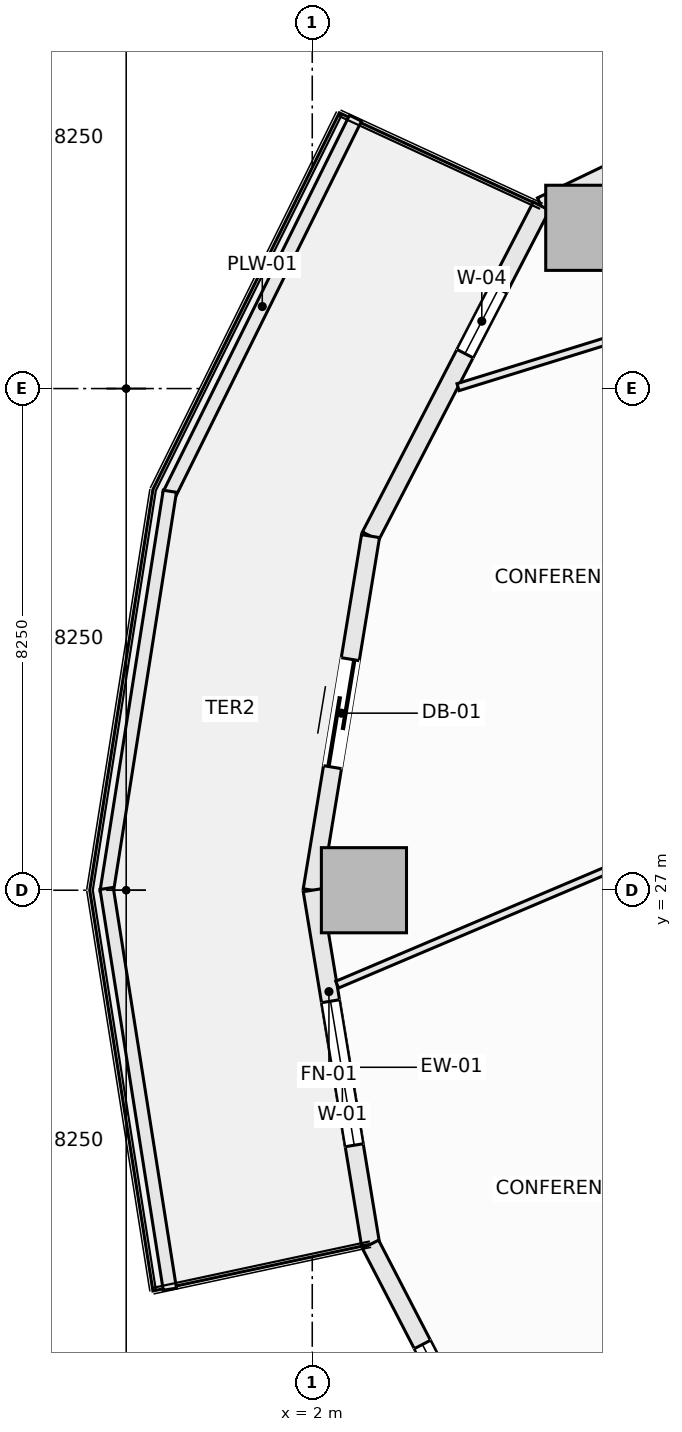
"""IFC4 building model, lengths in metres.
Left out: names, types, materials, properties, quantities, classifications, styles, units other than length and angle.
Written with IfcOpenShell. Run it as: python <this file> out.ifc"""

import sys

from ifc_helpers import new_model, si_unit, direction, frame, frame_2d, origin, origin_2d, place, context, subcontext, project, spatial, rectangle, extrude, element, fill, save


model = new_model("IFC4")
c1 = context("Model", 3, precision=1e-05, world=origin(), true_north=direction((0.0, 1.0)))
c2 = subcontext(c1, "Body", "Model", "MODEL_VIEW")
j1 = project(units=[si_unit("LENGTHUNIT", "METRE"), si_unit("PLANEANGLEUNIT", "RADIAN")], contexts=[c1])
p1 = place(None, origin())
s1 = spatial("IfcSite", under=j1, at=p1, CompositionType="ELEMENT")
p2 = place(p1, origin())
s2 = spatial("IfcBuilding", under=s1, at=p2, CompositionType="ELEMENT")
p3 = place(p2, frame((0.0, 0.0, 41.9)))
s3 = spatial("IfcBuildingStorey", under=s2, at=p3, CompositionType="ELEMENT", Elevation=41.9)
for number, where, z_axis, x_axis in (
    (1, (6.54, 37.894, -0.28), (0.0, 0.0, 1.0), (1.0, 0.0, 0.0)),
    (2, (2.85, 27.0, -0.28), (0.0, 0.0, 1.0), (1.0, 0.0, 0.0)),
):
    element("IfcColumn", number, at=place(p3, frame(where, z_axis=z_axis, x_axis=x_axis)), inside=s3, PredefinedType="COLUMN", context=c2, shape_type="SweptSolid", body=[
        extrude(rectangle(XDim=1.4, YDim=1.4, at=origin_2d()), origin(), (0.0, 0.0, 1.0), 3.85),
    ])
p4 = place(p3, frame((5.768, 38.25, 0.0), z_axis=(0.0, 0.0, 1.0), x_axis=(0.901360393999, 0.433069786673, 0.0)))
e3 = element("IfcWall", 3, at=p4, inside=s3, PredefinedType="SOLIDWALL", context=c2, shape_type="SweptSolid", body=[
    extrude(rectangle(XDim=6.842, YDim=0.3, at=frame_2d((3.421, 0.0))), origin(), (0.0, 0.0, 1.0), 3.093),
])
p5 = place(p4, frame((2.221, 0.0, 0.85)))
e4 = element("IfcOpeningElement", 4, at=p5, cuts=e3, PredefinedType="OPENING", context=c2, shape_type="SweptSolid", body=[
    extrude(rectangle(XDim=2.4, YDim=1.9, at=frame_2d((1.2, 0.95))), frame((0.0, 0.16, 0.0), z_axis=(0.0, -1.0, 0.0), x_axis=(1.0, 0.0, 0.0)), (0.0, 0.0, 1.0), 0.32),
])
p6 = place(p3, frame((2.958, 32.823, 0.0), z_axis=(0.0, 0.0, 1.0), x_axis=(0.459809804413, 0.88801742312, 0.0)))
e5 = element("IfcWall", 5, at=p6, inside=s3, PredefinedType="SOLIDWALL", context=c2, shape_type="SweptSolid", body=[
    extrude(rectangle(XDim=6.111, YDim=0.3, at=frame_2d((3.055, 0.0))), origin(), (0.0, 0.0, 1.0), 3.093),
])
p7 = place(p6, frame((3.38, 0.0, 0.72)))
e6 = element("IfcOpeningElement", 6, at=p7, cuts=e5, PredefinedType="OPENING", context=c2, shape_type="SweptSolid", body=[
    extrude(rectangle(XDim=1.2, YDim=1.65, at=frame_2d((0.6, 0.825))), frame((0.0, 0.16, 0.0), z_axis=(0.0, -1.0, 0.0), x_axis=(1.0, 0.0, 0.0)), (0.0, 0.0, 1.0), 0.32),
])
p8 = place(p3, frame((2.0, 27.0, 0.0), z_axis=(0.0, 0.0, 1.0), x_axis=(0.162366057843, 0.98673059305, 0.0)))
e7 = element("IfcWall", 7, at=p8, inside=s3, PredefinedType="SOLIDWALL", context=c2, shape_type="SweptSolid", body=[
    extrude(rectangle(XDim=5.902, YDim=0.3, at=frame_2d((2.951, 0.0))), origin(), (0.0, 0.0, 1.0), 3.093),
])
p9 = place(p8, frame((2.051, 0.0, 0.0)))
e8 = element("IfcOpeningElement", 8, at=p9, cuts=e7, PredefinedType="OPENING", context=c2, shape_type="SweptSolid", body=[
    extrude(rectangle(XDim=1.8, YDim=2.25, at=frame_2d((0.9, 1.125))), frame((0.0, 0.16, 0.0), z_axis=(0.0, -1.0, 0.0), x_axis=(1.0, 0.0, 0.0)), (0.0, 0.0, 1.0), 0.32),
])
p10 = place(p3, frame((2.0, 27.0, 0.0), z_axis=(0.0, 0.0, 1.0), x_axis=(0.162366057843, -0.98673059305, 0.0)))
e9 = element("IfcWall", 9, at=p10, inside=s3, PredefinedType="SOLIDWALL", context=c2, shape_type="SweptSolid", body=[
    extrude(rectangle(XDim=5.902, YDim=0.3, at=frame_2d((2.951, 0.0))), origin(), (0.0, 0.0, 1.0), 3.093),
])
p11 = place(p10, frame((1.85, 0.0, 0.85)))
e10 = element("IfcOpeningElement", 10, at=p11, cuts=e9, PredefinedType="OPENING", context=c2, shape_type="SweptSolid", body=[
    extrude(rectangle(XDim=2.4, YDim=1.9, at=frame_2d((1.2, 0.95))), frame((0.0, 0.16, 0.0), z_axis=(0.0, -1.0, 0.0), x_axis=(1.0, 0.0, 0.0)), (0.0, 0.0, 1.0), 0.32),
])
p12 = place(p3, frame((2.958, 21.177, 0.0), z_axis=(0.0, 0.0, 1.0), x_axis=(0.459809804413, -0.88801742312, 0.0)))
e11 = element("IfcWall", 11, at=p12, inside=s3, PredefinedType="SOLIDWALL", context=c2, shape_type="SweptSolid", body=[
    extrude(rectangle(XDim=6.111, YDim=0.3, at=frame_2d((3.055, 0.0))), origin(), (0.0, 0.0, 1.0), 3.093),
])
p13 = place(p12, frame((1.855, 0.0, 0.85)))
e12 = element("IfcOpeningElement", 12, at=p13, cuts=e11, PredefinedType="OPENING", context=c2, shape_type="SweptSolid", body=[
    extrude(rectangle(XDim=2.4, YDim=1.9, at=frame_2d((1.2, 0.95))), frame((0.0, 0.16, 0.0), z_axis=(0.0, -1.0, 0.0), x_axis=(1.0, 0.0, 0.0)), (0.0, 0.0, 1.0), 0.32),
])
p14 = place(p3, frame((-0.354, 33.502, 0.0), z_axis=(0.0, 0.0, 1.0), x_axis=(0.443578479433, 0.8962355341, 0.0)))
e13 = element("IfcWall", 13, at=p14, inside=s3, PredefinedType="PARAPET", context=c2, shape_type="SweptSolid", body=[
    extrude(rectangle(XDim=6.911, YDim=0.22, at=frame_2d((3.456, 0.0))), origin(), (0.0, 0.0, 1.0), 0.52),
])
for number, where, z_axis, x_axis in (
    (14, (-1.382, 26.971, 0.0), (0.0, 0.0, 1.0), (0.156, 0.988, 0.0)),
    (15, (-1.382, 27.029, 0.0), (0.0, 0.0, 1.0), (0.156, -0.988, 0.0)),
):
    element("IfcWall", number, at=place(p3, frame(where, z_axis=z_axis, x_axis=x_axis)), inside=s3, PredefinedType="PARAPET", context=c2, shape_type="SweptSolid", body=[
        extrude(rectangle(XDim=6.672, YDim=0.22, at=frame_2d((3.336, 0.0))), origin(), (0.0, 0.0, 1.0), 0.52),
    ])
p15 = place(p3, frame((2.41, 25.447, 0.0), z_axis=(0.0, 0.0, 1.0), x_axis=(0.920624646574, 0.390448793211, 0.0)))
e16 = element("IfcWall", 16, at=p15, inside=s3, PredefinedType="PARTITIONING", context=c2, shape_type="SweptSolid", body=[
    extrude(rectangle(XDim=12.533, YDim=0.12, at=frame_2d((6.267, 0.0))), origin(), (0.0, 0.0, 1.0), 2.934),
])
p16 = place(p3, frame((4.398, 35.273, 0.0), z_axis=(0.0, 0.0, 1.0), x_axis=(0.955217133812, 0.295905774314, 0.0)))
e17 = element("IfcWall", 17, at=p16, inside=s3, PredefinedType="PARTITIONING", context=c2, shape_type="SweptSolid", body=[
    extrude(rectangle(XDim=19.828, YDim=0.12, at=frame_2d((9.914, 0.0))), origin(), (0.0, 0.0, 1.0), 3.205),
])
p17 = place(p7, origin())
e18 = element("IfcWindow", 18, at=p17, inside=s3, PartitioningType="SINGLE_PANEL", PredefinedType="WINDOW", context=c2, shape_type="SweptSolid", body=[
    extrude(rectangle(XDim=1.2, YDim=1.65, at=frame_2d((0.6, 0.825))), frame((0.0, 0.03, 0.0), z_axis=(0.0, -1.0, 0.0), x_axis=(1.0, 0.0, 0.0)), (0.0, 0.0, 1.0), 0.06),
])
fill(e6, e18)
p18 = place(p9, origin())
e19 = element("IfcDoor", 19, at=p18, inside=s3, OperationType="SLIDING_TO_LEFT", PredefinedType="DOOR", context=c2, shape_type="SweptSolid", body=[
    extrude(rectangle(XDim=1.8, YDim=2.25, at=frame_2d((0.9, 1.125))), frame((0.0, 0.025, 0.0), z_axis=(0.0, -1.0, 0.0), x_axis=(1.0, 0.0, 0.0)), (0.0, 0.0, 1.0), 0.05),
])
fill(e8, e19)
p19 = place(p11, origin())
e20 = element("IfcWindow", 20, at=p19, inside=s3, PartitioningType="SINGLE_PANEL", PredefinedType="WINDOW", context=c2, shape_type="SweptSolid", body=[
    extrude(rectangle(XDim=2.4, YDim=1.9, at=frame_2d((1.2, 0.95))), frame((0.0, 0.03, 0.0), z_axis=(0.0, -1.0, 0.0), x_axis=(1.0, 0.0, 0.0)), (0.0, 0.0, 1.0), 0.06),
])
fill(e10, e20)
p20 = place(p13, origin())
e21 = element("IfcWindow", 21, at=p20, inside=s3, PartitioningType="SINGLE_PANEL", PredefinedType="WINDOW", context=c2, shape_type="SweptSolid", body=[
    extrude(rectangle(XDim=2.4, YDim=1.9, at=frame_2d((1.2, 0.95))), frame((0.0, 0.03, 0.0), z_axis=(0.0, -1.0, 0.0), x_axis=(1.0, 0.0, 0.0)), (0.0, 0.0, 1.0), 0.06),
])
fill(e12, e21)
save(model, sys.argv[1])
